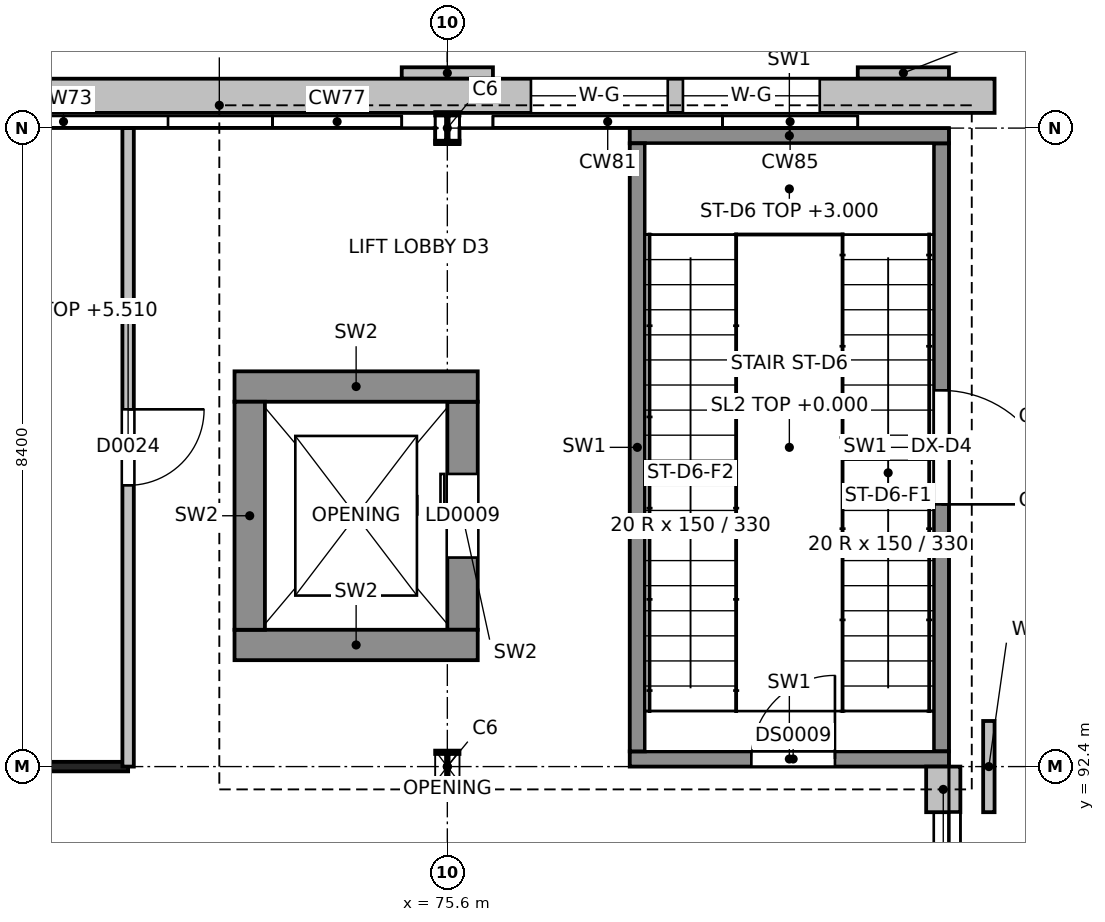
"""IFC4 building model, lengths in metres.
Left out: names, types, materials, properties, quantities, classifications, styles, units other than length and angle.
Written with IfcOpenShell. Run it as: python <this file> out.ifc"""

import sys

from ifc_helpers import new_model, si_unit, direction, frame, frame_2d, origin, origin_2d, place, context, subcontext, project, spatial, rectangle, i_section, extrude, element, fill, save


model = new_model("IFC4")
c1 = context("Model", 3, precision=1e-05, world=origin(), true_north=direction((0.0, 1.0)))
c2 = subcontext(c1, "Body", "Model", "MODEL_VIEW")
j1 = project(units=[si_unit("LENGTHUNIT", "METRE"), si_unit("PLANEANGLEUNIT", "RADIAN")], contexts=[c1])
p1 = place(None, origin())
s1 = spatial("IfcSite", under=j1, at=p1, CompositionType="ELEMENT")
p2 = place(p1, origin())
s2 = spatial("IfcBuilding", under=s1, at=p2, CompositionType="ELEMENT")
p3 = place(p2, origin())
s3 = spatial("IfcBuildingStorey", under=s2, at=p3, CompositionType="ELEMENT", Elevation=0.0)
for number, where, z_axis, x_axis in (
    (1, (75.6, 92.4, -1.35), (0.0, 0.0, 1.0), (1.0, 0.0, 0.0)),
    (2, (75.6, 100.8, -1.35), (0.0, 0.0, 1.0), (1.0, 0.0, 0.0)),
):
    element("IfcColumn", number, at=place(p3, frame(where, z_axis=z_axis, x_axis=x_axis)), inside=s3, PredefinedType="COLUMN", context=c2, shape_type="SweptSolid", body=[
        extrude(i_section(OverallWidth=0.3, OverallDepth=0.4, WebThickness=0.013, FlangeThickness=0.024, at=origin_2d()), origin(), (0.0, 0.0, 1.0), 7.35),
    ])
p4 = place(p3, frame((78.0, 92.5, -1.35), z_axis=(0.0, 0.0, 1.0), x_axis=(1.0, 0.0, 0.0)))
e3 = element("IfcWall", 3, at=p4, inside=s3, PredefinedType="SHEAR", context=c2, shape_type="SweptSolid", body=[
    extrude(rectangle(XDim=4.2, YDim=0.2, at=frame_2d((2.1, 0.0))), origin(), (0.0, 0.0, 1.0), 7.35),
])
p5 = place(p4, frame((1.6, 0.0, 1.35)))
e4 = element("IfcOpeningElement", 4, at=p5, cuts=e3, PredefinedType="OPENING", context=c2, shape_type="SweptSolid", body=[
    extrude(rectangle(XDim=1.1, YDim=2.1, at=frame_2d((0.55, 1.05))), frame((0.0, 0.1, 0.0), z_axis=(0.0, -1.0, 0.0), x_axis=(1.0, 0.0, 0.0)), (0.0, 0.0, 1.0), 0.2),
])
p6 = place(p3, frame((78.0, 100.7, -1.35), z_axis=(0.0, 0.0, 1.0), x_axis=(1.0, 0.0, 0.0)))
e5 = element("IfcWall", 5, at=p6, inside=s3, PredefinedType="SHEAR", context=c2, shape_type="SweptSolid", body=[
    extrude(rectangle(XDim=4.2, YDim=0.2, at=frame_2d((2.1, 0.0))), origin(), (0.0, 0.0, 1.0), 7.35),
])
p7 = place(p3, frame((78.1, 92.6, -1.35), z_axis=(0.0, 0.0, 1.0), x_axis=(0.0, 1.0, 0.0)))
e6 = element("IfcWall", 6, at=p7, inside=s3, PredefinedType="SHEAR", context=c2, shape_type="SweptSolid", body=[
    extrude(rectangle(XDim=8.0, YDim=0.2, at=frame_2d((4.0, 0.0))), origin(), (0.0, 0.0, 1.0), 7.35),
])
p8 = place(p3, frame((82.1, 92.6, -1.35), z_axis=(0.0, 0.0, 1.0), x_axis=(0.0, 1.0, 0.0)))
e7 = element("IfcWall", 7, at=p8, inside=s3, PredefinedType="SHEAR", context=c2, shape_type="SweptSolid", body=[
    extrude(rectangle(XDim=8.0, YDim=0.2, at=frame_2d((4.0, 0.0))), origin(), (0.0, 0.0, 1.0), 7.35),
])
p9 = place(p8, frame((3.25, 0.0, 1.35)))
e8 = element("IfcOpeningElement", 8, at=p9, cuts=e7, PredefinedType="OPENING", context=c2, shape_type="SweptSolid", body=[
    extrude(rectangle(XDim=1.5, YDim=2.4, at=frame_2d((0.75, 1.2))), frame((0.0, 0.1, 0.0), z_axis=(0.0, -1.0, 0.0), x_axis=(1.0, 0.0, 0.0)), (0.0, 0.0, 1.0), 0.2),
])
for number, where, z_axis, x_axis in (
    (9, (72.8, 94.0, -1.35), (0.0, 0.0, 1.0), (1.0, 0.0, 0.0)),
    (10, (72.8, 97.4, -1.35), (0.0, 0.0, 1.0), (1.0, 0.0, 0.0)),
):
    element("IfcWall", number, at=place(p3, frame(where, z_axis=z_axis, x_axis=x_axis)), inside=s3, PredefinedType="SHEAR", context=c2, shape_type="SweptSolid", body=[
        extrude(rectangle(XDim=3.2, YDim=0.4, at=frame_2d((1.6, 0.0))), origin(), (0.0, 0.0, 1.0), 7.35),
    ])
p10 = place(p3, frame((73.0, 94.2, -1.35), z_axis=(0.0, 0.0, 1.0), x_axis=(0.0, 1.0, 0.0)))
e11 = element("IfcWall", 11, at=p10, inside=s3, PredefinedType="SHEAR", context=c2, shape_type="SweptSolid", body=[
    extrude(rectangle(XDim=3.0, YDim=0.4, at=frame_2d((1.5, 0.0))), origin(), (0.0, 0.0, 1.0), 7.35),
])
p11 = place(p3, frame((75.8, 94.2, -1.35), z_axis=(0.0, 0.0, 1.0), x_axis=(0.0, 1.0, 0.0)))
e12 = element("IfcWall", 12, at=p11, inside=s3, PredefinedType="SHEAR", context=c2, shape_type="SweptSolid", body=[
    extrude(rectangle(XDim=3.0, YDim=0.4, at=frame_2d((1.5, 0.0))), origin(), (0.0, 0.0, 1.0), 7.35),
])
p12 = place(p11, frame((0.95, 0.0, 1.35)))
e13 = element("IfcOpeningElement", 13, at=p12, cuts=e12, PredefinedType="OPENING", context=c2, shape_type="SweptSolid", body=[
    extrude(rectangle(XDim=1.1, YDim=2.1, at=frame_2d((0.55, 1.05))), frame((0.0, 0.2, 0.0), z_axis=(0.0, -1.0, 0.0), x_axis=(1.0, 0.0, 0.0)), (0.0, 0.0, 1.0), 0.4),
])
p13 = place(p3, frame((82.175, 84.6, 0.0), z_axis=(0.0, 0.0, 1.0), x_axis=(0.0, 1.0, 0.0)))
e14 = element("IfcWall", 14, at=p13, inside=s3, PredefinedType="SOLIDWALL", context=c2, shape_type="SweptSolid", body=[
    extrude(rectangle(XDim=7.2, YDim=0.35, at=frame_2d((3.6, 0.0))), origin(), (0.0, 0.0, 1.0), 0.9),
])
p14 = place(p3, frame((82.125, 91.8, 0.0), z_axis=(0.0, 0.0, 1.0), x_axis=(0.0, 1.0, 0.0)))
e15 = element("IfcWall", 15, at=p14, inside=s3, PredefinedType="SOLIDWALL", context=c2, shape_type="SweptSolid", body=[
    extrude(rectangle(XDim=0.6, YDim=0.45, at=frame_2d((0.3, 0.0))), origin(), (0.0, 0.0, 1.0), 5.4),
])
p15 = place(p3, frame((82.725, 91.8, 0.0), z_axis=(0.0, 0.0, 1.0), x_axis=(0.0, 1.0, 0.0)))
e16 = element("IfcWall", 16, at=p15, inside=s3, PredefinedType="SOLIDWALL", context=c2, shape_type="SweptSolid", body=[
    extrude(rectangle(XDim=1.2, YDim=0.15, at=frame_2d((0.6, 0.0))), origin(), (0.0, 0.0, 1.0), 6.0),
])
p16 = place(p3, frame((43.2, 101.225, 0.0), z_axis=(0.0, 0.0, 1.0), x_axis=(1.0, 0.0, 0.0)))
e17 = element("IfcWall", 17, at=p16, inside=s3, PredefinedType="SOLIDWALL", context=c2, shape_type="SweptSolid", body=[
    extrude(rectangle(XDim=39.6, YDim=0.45, at=frame_2d((19.8, 0.0))), origin(), (0.0, 0.0, 1.0), 3.0),
])
p17 = place(p16, frame((2.3, 0.0, 0.9)))
e18 = element("IfcOpeningElement", 18, at=p17, cuts=e17, PredefinedType="OPENING", context=c2, shape_type="SweptSolid", body=[
    extrude(rectangle(XDim=1.8, YDim=1.8, at=frame_2d((0.9, 0.9))), frame((0.0, 0.225, 0.0), z_axis=(0.0, -1.0, 0.0), x_axis=(1.0, 0.0, 0.0)), (0.0, 0.0, 1.0), 0.45),
])
p18 = place(p16, frame((4.3, 0.0, 0.9)))
e19 = element("IfcOpeningElement", 19, at=p18, cuts=e17, PredefinedType="OPENING", context=c2, shape_type="SweptSolid", body=[
    extrude(rectangle(XDim=1.8, YDim=1.8, at=frame_2d((0.9, 0.9))), frame((0.0, 0.225, 0.0), z_axis=(0.0, -1.0, 0.0), x_axis=(1.0, 0.0, 0.0)), (0.0, 0.0, 1.0), 0.45),
])
p19 = place(p16, frame((10.2, 0.0, 0.0)))
e20 = element("IfcOpeningElement", 20, at=p19, cuts=e17, PredefinedType="OPENING", context=c2, shape_type="SweptSolid", body=[
    extrude(rectangle(XDim=2.4, YDim=2.4, at=frame_2d((1.2, 1.2))), frame((0.0, 0.225, 0.0), z_axis=(0.0, -1.0, 0.0), x_axis=(1.0, 0.0, 0.0)), (0.0, 0.0, 1.0), 0.45),
])
p20 = place(p16, frame((18.6, 0.0, 0.0)))
e21 = element("IfcOpeningElement", 21, at=p20, cuts=e17, PredefinedType="OPENING", context=c2, shape_type="SweptSolid", body=[
    extrude(rectangle(XDim=2.4, YDim=2.4, at=frame_2d((1.2, 1.2))), frame((0.0, 0.225, 0.0), z_axis=(0.0, -1.0, 0.0), x_axis=(1.0, 0.0, 0.0)), (0.0, 0.0, 1.0), 0.45),
])
p21 = place(p16, frame((33.5, 0.0, 0.9)))
e22 = element("IfcOpeningElement", 22, at=p21, cuts=e17, PredefinedType="OPENING", context=c2, shape_type="SweptSolid", body=[
    extrude(rectangle(XDim=1.8, YDim=1.8, at=frame_2d((0.9, 0.9))), frame((0.0, 0.225, 0.0), z_axis=(0.0, -1.0, 0.0), x_axis=(1.0, 0.0, 0.0)), (0.0, 0.0, 1.0), 0.45),
])
p22 = place(p16, frame((35.5, 0.0, 0.9)))
e23 = element("IfcOpeningElement", 23, at=p22, cuts=e17, PredefinedType="OPENING", context=c2, shape_type="SweptSolid", body=[
    extrude(rectangle(XDim=1.8, YDim=1.8, at=frame_2d((0.9, 0.9))), frame((0.0, 0.225, 0.0), z_axis=(0.0, -1.0, 0.0), x_axis=(1.0, 0.0, 0.0)), (0.0, 0.0, 1.0), 0.45),
])
for number, where, z_axis, x_axis in (
    (24, (75.0, 101.525, 0.0), (0.0, 0.0, 1.0), (1.0, 0.0, 0.0)),
    (25, (81.0, 101.525, 0.0), (0.0, 0.0, 1.0), (1.0, 0.0, 0.0)),
):
    element("IfcWall", number, at=place(p3, frame(where, z_axis=z_axis, x_axis=x_axis)), inside=s3, PredefinedType="SOLIDWALL", context=c2, shape_type="SweptSolid", body=[
        extrude(rectangle(XDim=1.2, YDim=0.15, at=frame_2d((0.6, 0.0))), origin(), (0.0, 0.0, 1.0), 6.0),
    ])
p23 = place(p3, frame((54.6, 92.4, 0.0), z_axis=(0.0, 0.0, 1.0), x_axis=(1.0, 0.0, 0.0)))
e26 = element("IfcWall", 26, at=p23, inside=s3, PredefinedType="PARTITIONING", context=c2, shape_type="SweptSolid", body=[
    extrude(rectangle(XDim=16.8, YDim=0.125, at=frame_2d((8.4, 0.0))), origin(), (0.0, 0.0, 1.0), 5.51),
])
p24 = place(p3, frame((71.4, 92.4, 0.0), z_axis=(0.0, 0.0, 1.0), x_axis=(0.0, 1.0, 0.0)))
e27 = element("IfcWall", 27, at=p24, inside=s3, PredefinedType="PARTITIONING", context=c2, shape_type="SweptSolid", body=[
    extrude(rectangle(XDim=8.4, YDim=0.15, at=frame_2d((4.2, 0.0))), origin(), (0.0, 0.0, 1.0), 5.51),
])
p25 = place(p24, frame((3.7, 0.0, 0.0)))
e28 = element("IfcOpeningElement", 28, at=p25, cuts=e27, PredefinedType="OPENING", context=c2, shape_type="SweptSolid", body=[
    extrude(rectangle(XDim=1.0, YDim=2.2, at=frame_2d((0.5, 1.1))), frame((0.0, 0.075, 0.0), z_axis=(0.0, -1.0, 0.0), x_axis=(1.0, 0.0, 0.0)), (0.0, 0.0, 1.0), 0.15),
])
p26 = place(p9, frame((1.5, 0.05, 0.0), z_axis=(0.0, 0.0, 1.0), x_axis=(-1.0, 0.0, 0.0)))
e29 = element("IfcDoor", 29, at=p26, inside=s3, OperationType="DOUBLE_DOOR_SINGLE_SWING", PredefinedType="DOOR", context=c2, shape_type="SweptSolid", body=[
    extrude(rectangle(XDim=1.5, YDim=2.4, at=frame_2d((0.75, 1.2))), frame((0.0, 0.025, 0.0), z_axis=(0.0, -1.0, 0.0), x_axis=(1.0, 0.0, 0.0)), (0.0, 0.0, 1.0), 0.05),
])
fill(e8, e29)
p27 = place(p21, origin())
e30 = element("IfcWindow", 30, at=p27, inside=s3, PartitioningType="SINGLE_PANEL", PredefinedType="WINDOW", context=c2, shape_type="SweptSolid", body=[
    extrude(rectangle(XDim=1.8, YDim=1.8, at=frame_2d((0.9, 0.9))), frame((0.0, 0.03, 0.0), z_axis=(0.0, -1.0, 0.0), x_axis=(1.0, 0.0, 0.0)), (0.0, 0.0, 1.0), 0.06),
])
fill(e22, e30)
p28 = place(p22, origin())
e31 = element("IfcWindow", 31, at=p28, inside=s3, PartitioningType="SINGLE_PANEL", PredefinedType="WINDOW", context=c2, shape_type="SweptSolid", body=[
    extrude(rectangle(XDim=1.8, YDim=1.8, at=frame_2d((0.9, 0.9))), frame((0.0, 0.03, 0.0), z_axis=(0.0, -1.0, 0.0), x_axis=(1.0, 0.0, 0.0)), (0.0, 0.0, 1.0), 0.06),
])
fill(e23, e31)
p29 = place(p25, origin())
e32 = element("IfcDoor", 32, at=p29, inside=s3, OperationType="SINGLE_SWING_RIGHT", PredefinedType="DOOR", context=c2, shape_type="SweptSolid", body=[
    extrude(rectangle(XDim=1.0, YDim=2.2, at=frame_2d((0.5, 1.1))), frame((0.0, 0.025, 0.0), z_axis=(0.0, -1.0, 0.0), x_axis=(1.0, 0.0, 0.0)), (0.0, 0.0, 1.0), 0.05),
])
fill(e28, e32)
p30 = place(p5, frame((1.1, 0.05, 0.0), z_axis=(0.0, 0.0, 1.0), x_axis=(-1.0, 0.0, 0.0)))
e33 = element("IfcDoor", 33, at=p30, inside=s3, OperationType="SINGLE_SWING_RIGHT", PredefinedType="DOOR", context=c2, shape_type="SweptSolid", body=[
    extrude(rectangle(XDim=1.1, YDim=2.1, at=frame_2d((0.55, 1.05))), frame((0.0, 0.025, 0.0), z_axis=(0.0, -1.0, 0.0), x_axis=(1.0, 0.0, 0.0)), (0.0, 0.0, 1.0), 0.05),
])
fill(e4, e33)
p31 = place(p12, origin())
e34 = element("IfcDoor", 34, at=p31, inside=s3, OperationType="SLIDING_TO_LEFT", PredefinedType="DOOR", context=c2, shape_type="SweptSolid", body=[
    extrude(rectangle(XDim=1.1, YDim=2.1, at=frame_2d((0.55, 1.05))), frame((0.0, 0.025, 0.0), z_axis=(0.0, -1.0, 0.0), x_axis=(1.0, 0.0, 0.0)), (0.0, 0.0, 1.0), 0.05),
])
fill(e13, e34)
save(model, sys.argv[1])
